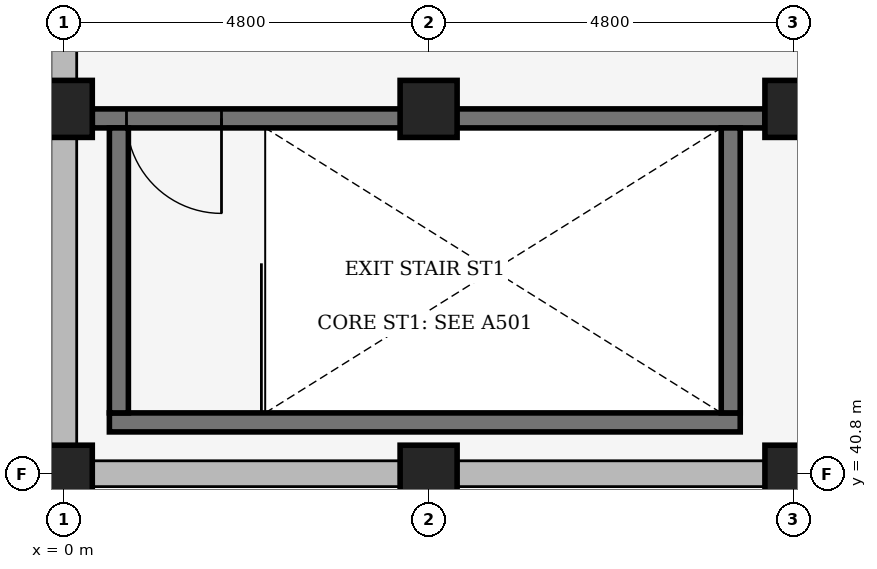
"""IFC4 building model, lengths in metres.
Left out: names, types, materials, properties, quantities, classifications, styles, units other than length and angle.
Written with IfcOpenShell. Run it as: python <this file> out.ifc"""

import sys

from ifc_helpers import new_model, si_unit, direction, frame, frame_2d, origin, origin_2d, place, context, subcontext, project, spatial, rectangle, extrude, element, fill, save


model = new_model("IFC4")
c1 = context("Model", 3, precision=1e-05, world=origin(), true_north=direction((0.0, 1.0)))
c2 = subcontext(c1, "Body", "Model", "MODEL_VIEW")
j1 = project(units=[si_unit("LENGTHUNIT", "METRE"), si_unit("PLANEANGLEUNIT", "RADIAN")], contexts=[c1])
p1 = place(None, origin())
s1 = spatial("IfcSite", under=j1, at=p1, CompositionType="ELEMENT")
p2 = place(p1, origin())
s2 = spatial("IfcBuilding", under=s1, at=p2, CompositionType="ELEMENT")
p3 = place(p2, frame((0.0, 0.0, 15.3)))
s3 = spatial("IfcBuildingStorey", under=s2, at=p3, CompositionType="ELEMENT", Elevation=15.3)
for number, where, z_axis, x_axis in (
    (1, (0.0, 40.8, 0.0), (0.0, 0.0, 1.0), (1.0, 0.0, 0.0)),
    (2, (0.0, 45.6, 0.0), (0.0, 0.0, 1.0), (1.0, 0.0, 0.0)),
    (3, (4.8, 40.8, 0.0), (0.0, 0.0, 1.0), (1.0, 0.0, 0.0)),
    (4, (4.8, 45.6, 0.0), (0.0, 0.0, 1.0), (1.0, 0.0, 0.0)),
    (5, (9.6, 40.8, 0.0), (0.0, 0.0, 1.0), (1.0, 0.0, 0.0)),
    (6, (9.6, 45.6, 0.0), (0.0, 0.0, 1.0), (1.0, 0.0, 0.0)),
):
    element("IfcColumn", number, at=place(p3, frame(where, z_axis=z_axis, x_axis=x_axis)), inside=s3, PredefinedType="COLUMN", context=c2, shape_type="SweptSolid", body=[
        extrude(rectangle(XDim=0.75, YDim=0.75, at=origin_2d()), origin(), (0.0, 0.0, 1.0), 4.5),
    ])
p4 = place(p3, frame((0.0, 50.017, 0.0), z_axis=(0.0, 0.0, 1.0), x_axis=(0.0, -1.0, 0.0)))
e7 = element("IfcWall", 7, at=p4, inside=s3, PredefinedType="SOLIDWALL", context=c2, shape_type="SweptSolid", body=[
    extrude(rectangle(XDim=4.034, YDim=0.34, at=frame_2d((2.017, 0.0))), origin(), (0.0, 0.0, 1.0), 4.075),
])
for number, where, z_axis, x_axis in (
    (8, (0.0, 45.217, 0.0), (0.0, 0.0, 1.0), (0.0, -1.0, 0.0)),
    (9, (0.383, 40.8, 0.0), (0.0, 0.0, 1.0), (1.0, 0.0, 0.0)),
    (10, (5.183, 40.8, 0.0), (0.0, 0.0, 1.0), (1.0, 0.0, 0.0)),
):
    element("IfcWall", number, at=place(p3, frame(where, z_axis=z_axis, x_axis=x_axis)), inside=s3, PredefinedType="SOLIDWALL", context=c2, shape_type="SweptSolid", body=[
        extrude(rectangle(XDim=4.034, YDim=0.34, at=frame_2d((2.017, 0.0))), origin(), (0.0, 0.0, 1.0), 4.075),
    ])
p5 = place(p3, frame((0.6, 41.475, 0.0), z_axis=(0.0, 0.0, 1.0), x_axis=(1.0, 0.0, 0.0)))
e11 = element("IfcWall", 11, at=p5, inside=s3, PredefinedType="SHEAR", context=c2, shape_type="SweptSolid", body=[
    extrude(rectangle(XDim=8.3, YDim=0.25, at=frame_2d((4.15, 0.0))), origin(), (0.0, 0.0, 1.0), 4.5),
])
p6 = place(p3, frame((9.225, 45.475, 0.0), z_axis=(0.0, 0.0, 1.0), x_axis=(-1.0, 0.0, 0.0)))
e12 = element("IfcWall", 12, at=p6, inside=s3, PredefinedType="SHEAR", context=c2, shape_type="SweptSolid", body=[
    extrude(rectangle(XDim=8.85, YDim=0.25, at=frame_2d((4.425, 0.0))), origin(), (0.0, 0.0, 1.0), 4.5),
])
p7 = place(p6, frame((8.4, 0.0, 0.0), z_axis=(0.0, 0.0, 1.0), x_axis=(-1.0, 0.0, 0.0)))
e13 = element("IfcOpeningElement", 13, at=p7, cuts=e12, PredefinedType="OPENING", context=c2, shape_type="SweptSolid", body=[
    extrude(rectangle(XDim=1.25, YDim=2.2, at=frame_2d((0.625, 1.1))), frame((0.0, 0.135, 0.0), z_axis=(0.0, -1.0, 0.0), x_axis=(1.0, 0.0, 0.0)), (0.0, 0.0, 1.0), 0.27),
])
for number, where, z_axis, x_axis in (
    (14, (0.725, 45.35, 0.0), (0.0, 0.0, 1.0), (0.0, -1.0, 0.0)),
    (15, (8.775, 41.6, 0.0), (0.0, 0.0, 1.0), (0.0, 1.0, 0.0)),
):
    element("IfcWall", number, at=place(p3, frame(where, z_axis=z_axis, x_axis=x_axis)), inside=s3, PredefinedType="SHEAR", context=c2, shape_type="SweptSolid", body=[
        extrude(rectangle(XDim=3.75, YDim=0.25, at=frame_2d((1.875, 0.0))), origin(), (0.0, 0.0, 1.0), 4.5),
    ])
p8 = place(p7, origin())
e16 = element("IfcDoor", 16, at=p8, inside=s3, OperationType="SINGLE_SWING_RIGHT", PredefinedType="DOOR", context=c2, shape_type="SweptSolid", body=[
    extrude(rectangle(XDim=1.25, YDim=2.2, at=frame_2d((0.625, 1.1))), frame((0.0, 0.025, 0.0), z_axis=(0.0, -1.0, 0.0), x_axis=(1.0, 0.0, 0.0)), (0.0, 0.0, 1.0), 0.05),
])
fill(e13, e16)
save(model, sys.argv[1])
